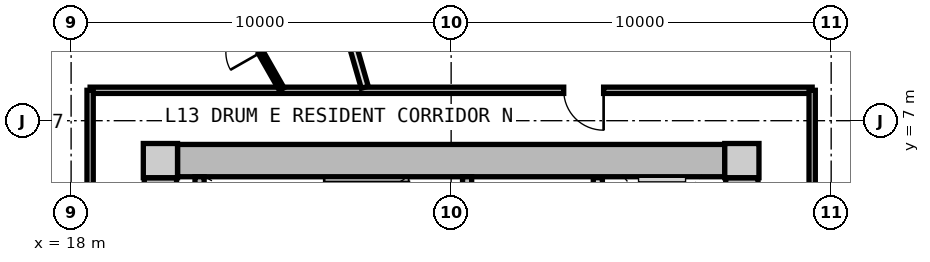
"""IFC4 building model, lengths in metres.
Left out: names, types, materials, properties, quantities, classifications, styles, units other than length and angle.
Written with IfcOpenShell. Run it as: python <this file> out.ifc"""

import sys

from ifc_helpers import new_model, si_unit, direction, frame, frame_2d, origin, origin_2d, place, context, subcontext, project, spatial, rectangle, extrude, source, transform, mapped, element, fill, save


model = new_model("IFC4")
c1 = context("Model", 3, precision=1e-05, world=origin(), true_north=direction((0.0, 1.0)))
c2 = subcontext(c1, "Body", "Model", "MODEL_VIEW")
j1 = project(units=[si_unit("LENGTHUNIT", "METRE"), si_unit("PLANEANGLEUNIT", "RADIAN")], contexts=[c1])
p1 = place(None, origin())
s1 = spatial("IfcSite", under=j1, at=p1, CompositionType="ELEMENT")
p2 = place(p1, origin())
s2 = spatial("IfcBuilding", under=s1, at=p2, CompositionType="ELEMENT")
p3 = place(p2, frame((0.0, 0.0, 46.0)))
s3 = spatial("IfcBuildingStorey", under=s2, at=p3, CompositionType="ELEMENT", Elevation=46.0)
m1 = source(origin(), c2, "Body", "SweptSolid", [
    extrude(rectangle(XDim=0.9, YDim=0.9, at=origin_2d()), origin(), (0.0, 0.0, 1.0), 3.05),
])
for number, where, z_axis, x_axis in (
    (1, (35.65, 5.95, 0.0), (0.0, 0.0, 1.0), (1.0, 0.0, 0.0)),
    (2, (20.35, 5.95, 0.0), (0.0, 0.0, 1.0), (1.0, 0.0, 0.0)),
):
    element("IfcColumn", number, at=place(p3, frame(where, z_axis=z_axis, x_axis=x_axis)), inside=s3, PredefinedType="COLUMN", context=c2, shape_type="MappedRepresentation", body=[
        mapped(m1, transform((0.0, 0.0, 0.0), x_axis=(1.0, 0.0, 0.0), y_axis=(0.0, 1.0, 0.0), z_axis=(0.0, 0.0, 1.0), scale=1.0)),
    ])
m2 = source(origin(), c2, "Body", "SweptSolid", [
    extrude(rectangle(XDim=14.4, YDim=0.85, at=frame_2d((7.2, 0.0))), origin(), (0.0, 0.0, 1.0), 2.79),
])
p4 = place(p3, frame((20.8, 5.95, 0.0), z_axis=(0.0, 0.0, 1.0), x_axis=(1.0, 0.0, 0.0)))
e3 = element("IfcWall", 3, at=p4, inside=s3, PredefinedType="SHEAR", context=c2, shape_type="MappedRepresentation", body=[
    mapped(m2, transform((0.0, 0.0, 0.0), x_axis=(1.0, 0.0, 0.0), y_axis=(0.0, 1.0, 0.0), z_axis=(0.0, 0.0, 1.0), scale=1.0)),
])
m3 = source(origin(), c2, "Body", "SweptSolid", [
    extrude(rectangle(XDim=11.0, YDim=0.85, at=frame_2d((5.5, 0.0))), origin(), (0.0, 0.0, 1.0), 2.79),
])
p5 = place(p3, frame((20.35, -5.5, 0.0), z_axis=(0.0, 0.0, 1.0), x_axis=(0.0, 1.0, 0.0)))
e4 = element("IfcWall", 4, at=p5, inside=s3, PredefinedType="SHEAR", context=c2, shape_type="MappedRepresentation", body=[
    mapped(m3, transform((0.0, 0.0, 0.0), x_axis=(1.0, 0.0, 0.0), y_axis=(0.0, 1.0, 0.0), z_axis=(0.0, 0.0, 1.0), scale=1.0)),
])
p6 = place(p5, frame((3.8, 0.0, 0.0)))
e5 = element("IfcOpeningElement", 5, at=p6, cuts=e4, PredefinedType="OPENING", context=c2, shape_type="SweptSolid", body=[
    extrude(rectangle(XDim=1.2, YDim=2.15, at=frame_2d((0.6, 1.075))), frame((0.0, 0.435, 0.0), z_axis=(0.0, -1.0, 0.0), x_axis=(1.0, 0.0, 0.0)), (0.0, 0.0, 1.0), 0.87),
])
p7 = place(p3, frame((35.65, 5.5, 0.0), z_axis=(0.0, 0.0, 1.0), x_axis=(0.0, -1.0, 0.0)))
e6 = element("IfcWall", 6, at=p7, inside=s3, PredefinedType="SHEAR", context=c2, shape_type="MappedRepresentation", body=[
    mapped(m3, transform((0.0, 0.0, 0.0), x_axis=(1.0, 0.0, 0.0), y_axis=(0.0, 1.0, 0.0), z_axis=(0.0, 0.0, 1.0), scale=1.0)),
])
p8 = place(p7, frame((5.65, 0.0, 0.0)))
e7 = element("IfcOpeningElement", 7, at=p8, cuts=e6, PredefinedType="OPENING", context=c2, shape_type="SweptSolid", body=[
    extrude(rectangle(XDim=1.2, YDim=2.15, at=frame_2d((0.6, 1.075))), frame((0.0, 0.435, 0.0), z_axis=(0.0, -1.0, 0.0), x_axis=(1.0, 0.0, 0.0)), (0.0, 0.0, 1.0), 0.87),
])
m4 = source(origin(), c2, "Body", "SweptSolid", [
    extrude(rectangle(XDim=3.075, YDim=0.24, at=frame_2d((1.538, 0.0))), origin(), (0.0, 0.0, 1.0), 2.79),
])
p9 = place(p3, frame((21.38, 2.45, 0.0), z_axis=(0.0, 0.0, 1.0), x_axis=(0.0, 1.0, 0.0)))
e8 = element("IfcWall", 8, at=p9, inside=s3, PredefinedType="PARTITIONING", context=c2, shape_type="MappedRepresentation", body=[
    mapped(m4, transform((0.0, 0.0, 0.0), x_axis=(1.0, 0.0, 0.0), y_axis=(0.0, 1.0, 0.0), z_axis=(0.0, 0.0, 1.0), scale=1.0)),
])
p10 = place(p3, frame((28.42, 2.45, 0.0), z_axis=(0.0, 0.0, 1.0), x_axis=(0.0, 1.0, 0.0)))
e9 = element("IfcWall", 9, at=p10, inside=s3, PredefinedType="PARTITIONING", context=c2, shape_type="MappedRepresentation", body=[
    mapped(m4, transform((0.0, 0.0, 0.0), x_axis=(1.0, 0.0, 0.0), y_axis=(0.0, 1.0, 0.0), z_axis=(0.0, 0.0, 1.0), scale=1.0)),
])
p11 = place(p10, frame((0.55, 0.0, 0.0)))
e10 = element("IfcOpeningElement", 10, at=p11, cuts=e9, PredefinedType="OPENING", context=c2, shape_type="SweptSolid", body=[
    extrude(rectangle(XDim=1.1, YDim=2.15, at=frame_2d((0.55, 1.075))), frame((0.0, 0.13, 0.0), z_axis=(0.0, -1.0, 0.0), x_axis=(1.0, 0.0, 0.0)), (0.0, 0.0, 1.0), 0.26),
])
m5 = source(origin(), c2, "Body", "SweptSolid", [
    extrude(rectangle(XDim=5.0, YDim=0.24, at=frame_2d((2.5, 0.0))), origin(), (0.0, 0.0, 1.0), 2.775),
])
p12 = place(p3, frame((31.86, 0.5, 0.0), z_axis=(0.0, 0.0, 1.0), x_axis=(0.0, 1.0, 0.0)))
e11 = element("IfcWall", 11, at=p12, inside=s3, PredefinedType="PARTITIONING", context=c2, shape_type="MappedRepresentation", body=[
    mapped(m5, transform((0.0, 0.0, 0.0), x_axis=(1.0, 0.0, 0.0), y_axis=(0.0, 1.0, 0.0), z_axis=(0.0, 0.0, 1.0), scale=1.0)),
])
p13 = place(p12, frame((3.05, 0.0, 0.0)))
e12 = element("IfcOpeningElement", 12, at=p13, cuts=e11, PredefinedType="OPENING", context=c2, shape_type="SweptSolid", body=[
    extrude(rectangle(XDim=1.3, YDim=2.2, at=frame_2d((0.65, 1.1))), frame((0.0, 0.13, 0.0), z_axis=(0.0, -1.0, 0.0), x_axis=(1.0, 0.0, 0.0)), (0.0, 0.0, 1.0), 0.26),
])
p14 = place(p12, frame((0.55, 0.0, 0.0)))
e13 = element("IfcOpeningElement", 13, at=p14, cuts=e11, PredefinedType="OPENING", context=c2, shape_type="SweptSolid", body=[
    extrude(rectangle(XDim=1.3, YDim=2.2, at=frame_2d((0.65, 1.1))), frame((0.0, 0.13, 0.0), z_axis=(0.0, -1.0, 0.0), x_axis=(1.0, 0.0, 0.0)), (0.0, 0.0, 1.0), 0.26),
])
m6 = source(origin(), c2, "Body", "SweptSolid", [
    extrude(rectangle(XDim=19.0, YDim=0.165, at=frame_2d((9.5, 0.0))), origin(), (0.0, 0.0, 1.0), 2.775),
])
p15 = place(p3, frame((18.5, 7.8, 0.0), z_axis=(0.0, 0.0, 1.0), x_axis=(1.0, 0.0, 0.0)))
e14 = element("IfcWall", 14, at=p15, inside=s3, PredefinedType="PARTITIONING", context=c2, shape_type="MappedRepresentation", body=[
    mapped(m6, transform((0.0, 0.0, 0.0), x_axis=(1.0, 0.0, 0.0), y_axis=(0.0, 1.0, 0.0), z_axis=(0.0, 0.0, 1.0), scale=1.0)),
])
p16 = place(p15, frame((12.462, 0.0, 0.0)))
e15 = element("IfcOpeningElement", 15, at=p16, cuts=e14, PredefinedType="OPENING", context=c2, shape_type="SweptSolid", body=[
    extrude(rectangle(XDim=1.05, YDim=2.15, at=frame_2d((0.525, 1.075))), frame((0.0, 0.093, 0.0), z_axis=(0.0, -1.0, 0.0), x_axis=(1.0, 0.0, 0.0)), (0.0, 0.0, 1.0), 0.185),
])
m7 = source(origin(), c2, "Body", "SweptSolid", [
    extrude(rectangle(XDim=15.6, YDim=0.165, at=frame_2d((7.8, 0.0))), origin(), (0.0, 0.0, 1.0), 2.775),
])
p17 = place(p3, frame((18.5, -7.8, 0.0), z_axis=(0.0, 0.0, 1.0), x_axis=(0.0, 1.0, 0.0)))
e16 = element("IfcWall", 16, at=p17, inside=s3, PredefinedType="PARTITIONING", context=c2, shape_type="MappedRepresentation", body=[
    mapped(m7, transform((0.0, 0.0, 0.0), x_axis=(1.0, 0.0, 0.0), y_axis=(0.0, 1.0, 0.0), z_axis=(0.0, 0.0, 1.0), scale=1.0)),
])
p18 = place(p17, frame((7.275, 0.0, 0.0)))
e17 = element("IfcOpeningElement", 17, at=p18, cuts=e16, PredefinedType="OPENING", context=c2, shape_type="SweptSolid", body=[
    extrude(rectangle(XDim=1.05, YDim=2.15, at=frame_2d((0.525, 1.075))), frame((0.0, 0.093, 0.0), z_axis=(0.0, -1.0, 0.0), x_axis=(1.0, 0.0, 0.0)), (0.0, 0.0, 1.0), 0.185),
])
p19 = place(p3, frame((37.5, 7.8, 0.0), z_axis=(0.0, 0.0, 1.0), x_axis=(0.0, -1.0, 0.0)))
e18 = element("IfcWall", 18, at=p19, inside=s3, PredefinedType="PARTITIONING", context=c2, shape_type="MappedRepresentation", body=[
    mapped(m7, transform((0.0, 0.0, 0.0), x_axis=(1.0, 0.0, 0.0), y_axis=(0.0, 1.0, 0.0), z_axis=(0.0, 0.0, 1.0), scale=1.0)),
])
p20 = place(p19, frame((14.215, 0.0, 0.0)))
e19 = element("IfcOpeningElement", 19, at=p20, cuts=e18, PredefinedType="OPENING", context=c2, shape_type="SweptSolid", body=[
    extrude(rectangle(XDim=0.92, YDim=2.1, at=frame_2d((0.46, 1.05))), frame((0.0, 0.093, 0.0), z_axis=(0.0, -1.0, 0.0), x_axis=(1.0, 0.0, 0.0)), (0.0, 0.0, 1.0), 0.185),
])
p21 = place(p19, frame((11.609, 0.0, 0.0)))
e20 = element("IfcOpeningElement", 20, at=p21, cuts=e18, PredefinedType="OPENING", context=c2, shape_type="SweptSolid", body=[
    extrude(rectangle(XDim=0.92, YDim=2.1, at=frame_2d((0.46, 1.05))), frame((0.0, 0.093, 0.0), z_axis=(0.0, -1.0, 0.0), x_axis=(1.0, 0.0, 0.0)), (0.0, 0.0, 1.0), 0.185),
])
p22 = place(p19, frame((7.175, 0.0, 0.0)))
e21 = element("IfcOpeningElement", 21, at=p22, cuts=e18, PredefinedType="OPENING", context=c2, shape_type="SweptSolid", body=[
    extrude(rectangle(XDim=1.25, YDim=2.2, at=frame_2d((0.625, 1.1))), frame((0.0, 0.093, 0.0), z_axis=(0.0, -1.0, 0.0), x_axis=(1.0, 0.0, 0.0)), (0.0, 0.0, 1.0), 0.185),
])
m8 = source(origin(), c2, "Body", "SweptSolid", [
    extrude(rectangle(XDim=10.196, YDim=0.19, at=frame_2d((5.098, 0.0))), origin(), (0.0, 0.0, 1.0), 2.225),
])
p23 = place(p3, frame((25.727, 7.88, 0.0), z_axis=(0.0, 0.0, 1.0), x_axis=(-0.277136420347, 0.960830580549, 0.0)))
e22 = element("IfcWall", 22, at=p23, inside=s3, PredefinedType="PARTITIONING", context=c2, shape_type="MappedRepresentation", body=[
    mapped(m8, transform((0.0, 0.0, 0.0), x_axis=(1.0, 0.0, 0.0), y_axis=(0.0, 1.0, 0.0), z_axis=(0.0, 0.0, 1.0), scale=1.0)),
])
m9 = source(origin(), c2, "Body", "SweptSolid", [
    extrude(rectangle(XDim=3.141, YDim=0.14, at=frame_2d((1.571, 0.0))), origin(), (0.0, 0.0, 1.0), 2.775),
])
p24 = place(p3, frame((23.542, 7.83, 0.0), z_axis=(0.0, 0.0, 1.0), x_axis=(-0.494874486088, 0.868964465913, 0.0)))
e23 = element("IfcWall", 23, at=p24, inside=s3, PredefinedType="PARTITIONING", context=c2, shape_type="MappedRepresentation", body=[
    mapped(m9, transform((0.0, 0.0, 0.0), x_axis=(1.0, 0.0, 0.0), y_axis=(0.0, 1.0, 0.0), z_axis=(0.0, 0.0, 1.0), scale=1.0)),
])
p25 = place(p24, frame((1.111, 0.0, 0.0)))
e24 = element("IfcOpeningElement", 24, at=p25, cuts=e23, PredefinedType="OPENING", context=c2, shape_type="SweptSolid", body=[
    extrude(rectangle(XDim=0.92, YDim=2.1, at=frame_2d((0.46, 1.05))), frame((0.0, 0.08, 0.0), z_axis=(0.0, -1.0, 0.0), x_axis=(1.0, 0.0, 0.0)), (0.0, 0.0, 1.0), 0.16),
])
m10 = source(origin(), c2, "Body", "SweptSolid", [
    extrude(rectangle(XDim=2.834, YDim=0.14, at=frame_2d((1.417, 0.0))), origin(), (0.0, 0.0, 1.0), 2.775),
])
p26 = place(p3, frame((37.53, 4.732, 0.0), z_axis=(0.0, 0.0, 1.0), x_axis=(0.895681174462, 0.444696788513, 0.0)))
e25 = element("IfcWall", 25, at=p26, inside=s3, PredefinedType="PARTITIONING", context=c2, shape_type="MappedRepresentation", body=[
    mapped(m10, transform((0.0, 0.0, 0.0), x_axis=(1.0, 0.0, 0.0), y_axis=(0.0, 1.0, 0.0), z_axis=(0.0, 0.0, 1.0), scale=1.0)),
])
m11 = source(origin(), c2, "Body", "SweptSolid", [
    extrude(rectangle(XDim=0.92, YDim=2.1, at=frame_2d((0.46, 1.05))), frame((0.0, 0.025, 0.0), z_axis=(0.0, -1.0, 0.0), x_axis=(1.0, 0.0, 0.0)), (0.0, 0.0, 1.0), 0.05),
])
p27 = place(p25, origin())
e26 = element("IfcDoor", 26, at=p27, inside=s3, OperationType="SINGLE_SWING_LEFT", PredefinedType="DOOR", context=c2, shape_type="MappedRepresentation", body=[
    mapped(m11, transform((0.0, 0.0, 0.0), x_axis=(1.0, 0.0, 0.0), y_axis=(0.0, 1.0, 0.0), z_axis=(0.0, 0.0, 1.0), scale=1.0)),
])
fill(e24, e26)
m12 = source(origin(), c2, "Body", "SweptSolid", [
    extrude(rectangle(XDim=1.05, YDim=2.15, at=frame_2d((0.525, 1.075))), frame((0.0, 0.025, 0.0), z_axis=(0.0, -1.0, 0.0), x_axis=(1.0, 0.0, 0.0)), (0.0, 0.0, 1.0), 0.05),
])
p28 = place(p16, frame((1.05, 0.0, 0.0), z_axis=(0.0, 0.0, 1.0), x_axis=(-1.0, 0.0, 0.0)))
e27 = element("IfcDoor", 27, at=p28, inside=s3, OperationType="SINGLE_SWING_LEFT", PredefinedType="DOOR", context=c2, shape_type="MappedRepresentation", body=[
    mapped(m12, transform((0.0, 0.0, 0.0), x_axis=(1.0, 0.0, 0.0), y_axis=(0.0, 1.0, 0.0), z_axis=(0.0, 0.0, 1.0), scale=1.0)),
])
fill(e15, e27)
save(model, sys.argv[1])
